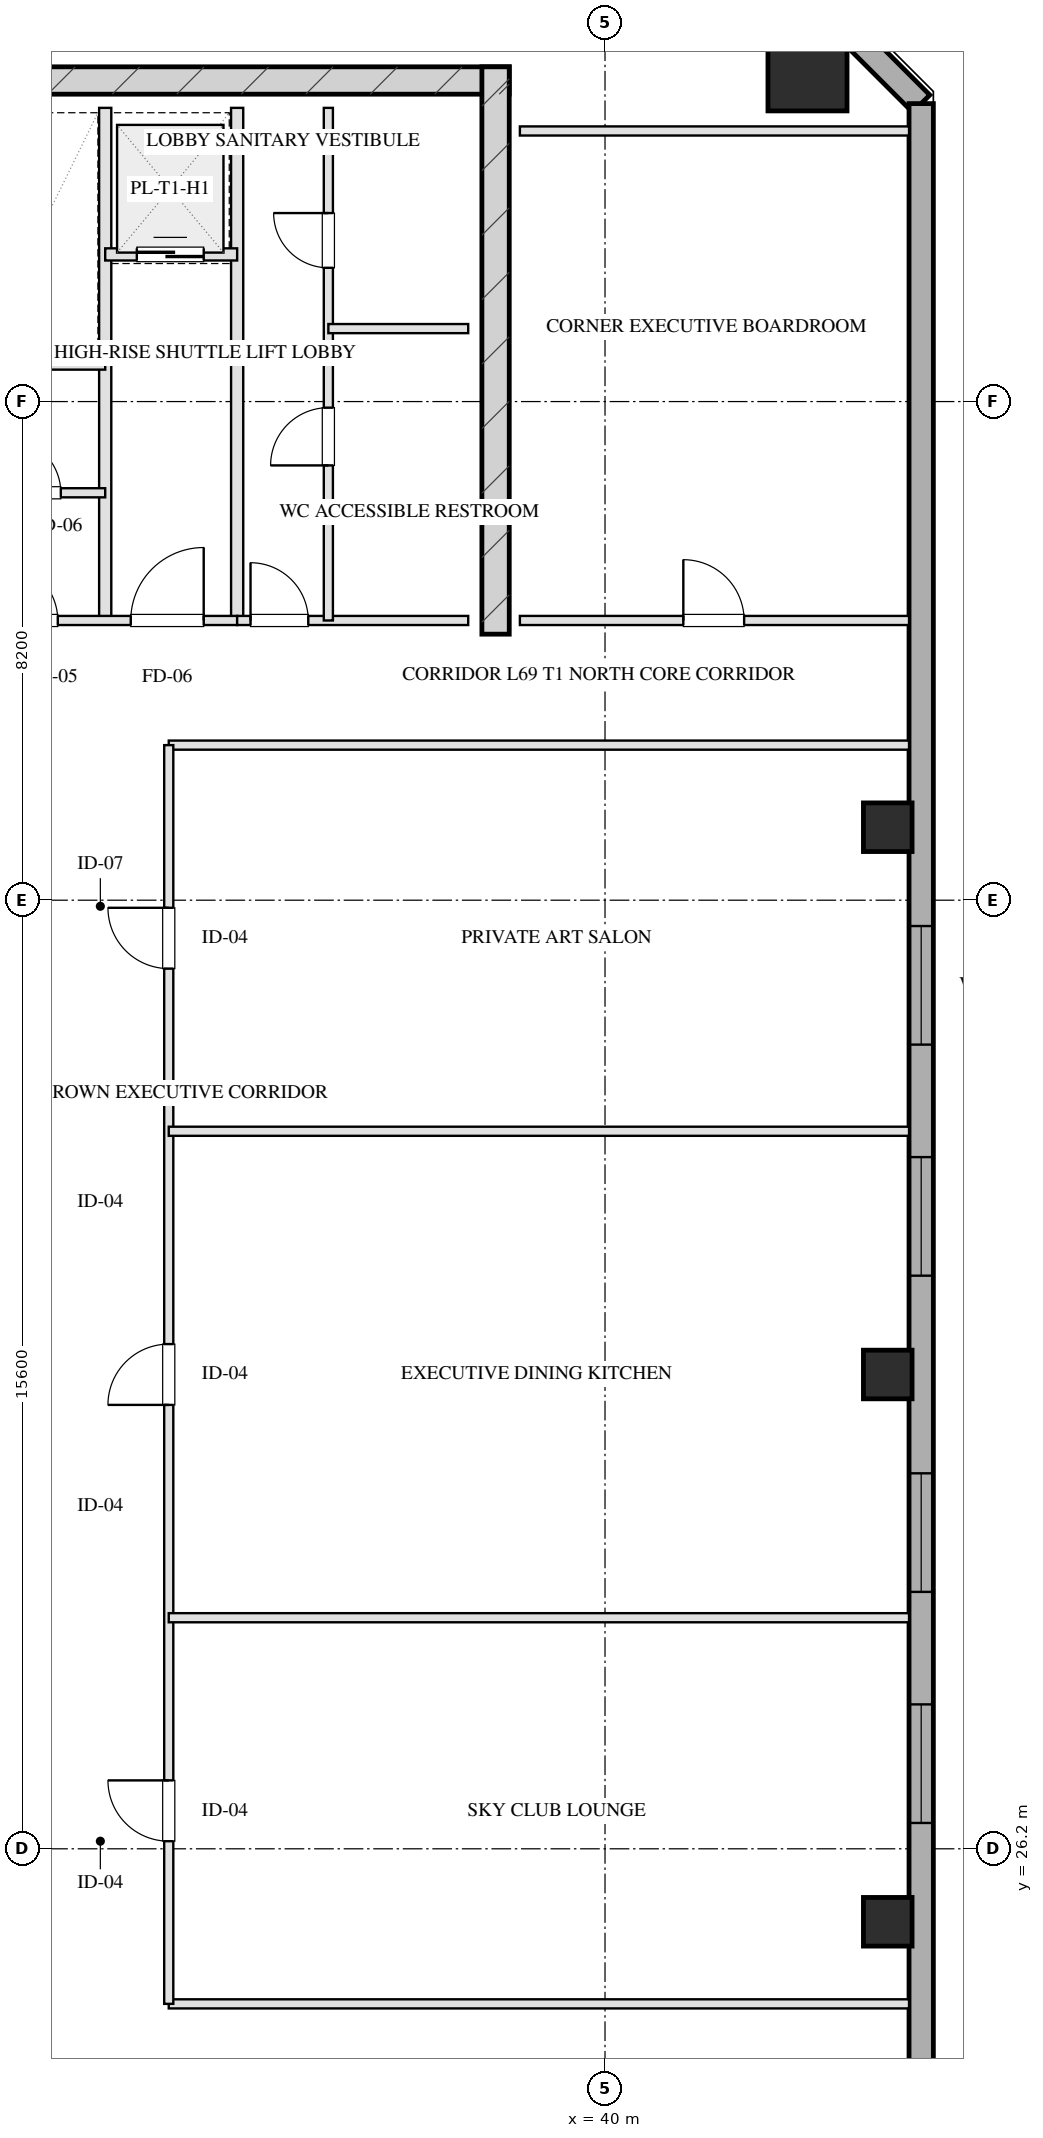
"""IFC4 building model, lengths in metres.
Left out: names, types, materials, properties, quantities, classifications, styles, units other than length and angle.
Written with IfcOpenShell. Run it as: python <this file> out.ifc"""

import sys

from ifc_helpers import new_model, si_unit, direction, frame, frame_2d, origin, origin_2d, place, context, subcontext, project, spatial, rectangle, hollow_rectangle, extrude, element, fill, save


model = new_model("IFC4")
c1 = context("Model", 3, precision=1e-05, world=origin(), true_north=direction((0.0, 1.0)))
c2 = subcontext(c1, "Body", "Model", "MODEL_VIEW")
j1 = project(units=[si_unit("LENGTHUNIT", "METRE"), si_unit("PLANEANGLEUNIT", "RADIAN")], contexts=[c1])
p1 = place(None, origin())
s1 = spatial("IfcSite", under=j1, at=p1, CompositionType="ELEMENT")
p2 = place(p1, origin())
s2 = spatial("IfcBuilding", under=s1, at=p2, CompositionType="ELEMENT")
p3 = place(p2, frame((0.0, 0.0, 253.6)))
s3 = spatial("IfcBuildingStorey", under=s2, at=p3, CompositionType="ELEMENT", Elevation=253.6)
p4 = place(p3, frame((21.575, 55.28, 0.0), z_axis=(0.0, 0.0, 1.0), x_axis=(1.0, 0.0, 0.0)))
e1 = element("IfcWall", 1, at=p4, inside=s3, PredefinedType="SHEAR", context=c2, shape_type="SweptSolid", body=[
    extrude(rectangle(XDim=16.85, YDim=0.45, at=frame_2d((8.425, 0.0))), origin(), (0.0, 0.0, 1.0), 3.2),
])
p5 = place(p3, frame((38.2, 46.175, 0.0), z_axis=(0.0, 0.0, 1.0), x_axis=(0.0, 1.0, 0.0)))
e2 = element("IfcWall", 2, at=p5, inside=s3, PredefinedType="SHEAR", context=c2, shape_type="SweptSolid", body=[
    extrude(rectangle(XDim=9.33, YDim=0.45, at=frame_2d((4.665, 0.0))), origin(), (0.0, 0.0, 1.0), 3.2),
])
p6 = place(p3, frame((43.33, 55.43, 0.0), z_axis=(0.0, 0.0, 1.0), x_axis=(1.0, 0.0, 0.0)))
e3 = element("IfcColumn", 3, at=p6, inside=s3, PredefinedType="COLUMN", context=c2, shape_type="SweptSolid", body=[
    extrude(hollow_rectangle(XDim=1.3, YDim=1.3, WallThickness=0.045, at=origin_2d()), origin(), (0.0, 0.0, 1.0), 3.201),
])
for number, where, z_axis, x_axis in (
    (4, (44.65, 25.0, 0.0), (0.0, 0.0, 1.0), (1.0, 0.0, 0.0)),
    (5, (44.65, 34.0, 0.0), (0.0, 0.0, 1.0), (1.0, 0.0, 0.0)),
    (6, (44.65, 43.0, 0.0), (0.0, 0.0, 1.0), (1.0, 0.0, 0.0)),
):
    element("IfcColumn", number, at=place(p3, frame(where, z_axis=z_axis, x_axis=x_axis)), inside=s3, PredefinedType="COLUMN", context=c2, shape_type="SweptSolid", body=[
        extrude(hollow_rectangle(XDim=0.8, YDim=0.8, WallThickness=0.028, at=origin_2d()), origin(), (0.0, 0.0, 1.0), 3.201),
    ])
p7 = place(p3, frame((42.8, 57.3, 0.0), z_axis=(0.0, 0.0, 1.0), x_axis=(0.707070815327, -0.707142745217, 0.0)))
e7 = element("IfcWall", 7, at=p7, inside=s3, PredefinedType="SOLIDWALL", context=c2, shape_type="SweptSolid", body=[
    extrude(rectangle(XDim=3.394, YDim=0.4, at=frame_2d((1.697, 0.0))), origin(), (0.0, 0.0, 1.0), 2.36),
])
p8 = place(p3, frame((45.2, 54.9, 0.0), z_axis=(0.0, 0.0, 1.0), x_axis=(0.0, -1.0, 0.0)))
e8 = element("IfcWall", 8, at=p8, inside=s3, PredefinedType="SOLIDWALL", context=c2, shape_type="SweptSolid", body=[
    extrude(rectangle(XDim=41.8, YDim=0.4, at=frame_2d((20.9, 0.0))), origin(), (0.0, 0.0, 1.0), 2.36),
])
p9 = place(p8, frame((26.325, 0.0, 0.75)))
e9 = element("IfcOpeningElement", 9, at=p9, cuts=e8, PredefinedType="OPENING", context=c2, shape_type="SweptSolid", body=[
    extrude(rectangle(XDim=1.95, YDim=1.21, at=frame_2d((0.975, 0.605))), frame((0.0, 0.21, 0.0), z_axis=(0.0, -1.0, 0.0), x_axis=(1.0, 0.0, 0.0)), (0.0, 0.0, 1.0), 0.42),
])
p10 = place(p8, frame((22.525, 0.0, 0.75)))
e10 = element("IfcOpeningElement", 10, at=p10, cuts=e8, PredefinedType="OPENING", context=c2, shape_type="SweptSolid", body=[
    extrude(rectangle(XDim=1.95, YDim=1.21, at=frame_2d((0.975, 0.605))), frame((0.0, 0.21, 0.0), z_axis=(0.0, -1.0, 0.0), x_axis=(1.0, 0.0, 0.0)), (0.0, 0.0, 1.0), 0.42),
])
p11 = place(p8, frame((17.325, 0.0, 0.75)))
e11 = element("IfcOpeningElement", 11, at=p11, cuts=e8, PredefinedType="OPENING", context=c2, shape_type="SweptSolid", body=[
    extrude(rectangle(XDim=1.95, YDim=1.21, at=frame_2d((0.975, 0.605))), frame((0.0, 0.21, 0.0), z_axis=(0.0, -1.0, 0.0), x_axis=(1.0, 0.0, 0.0)), (0.0, 0.0, 1.0), 0.42),
])
p12 = place(p8, frame((13.525, 0.0, 0.75)))
e12 = element("IfcOpeningElement", 12, at=p12, cuts=e8, PredefinedType="OPENING", context=c2, shape_type="SweptSolid", body=[
    extrude(rectangle(XDim=1.95, YDim=1.21, at=frame_2d((0.975, 0.605))), frame((0.0, 0.21, 0.0), z_axis=(0.0, -1.0, 0.0), x_axis=(1.0, 0.0, 0.0)), (0.0, 0.0, 1.0), 0.42),
])
for number, where, z_axis, x_axis in (
    (13, (33.95, 46.4, 0.0), (0.0, 0.0, 1.0), (0.0, 1.0, 0.0)),
    (14, (31.78, 46.4, 0.0), (0.0, 0.0, 1.0), (0.0, 1.0, 0.0)),
):
    element("IfcWall", number, at=place(p3, frame(where, z_axis=z_axis, x_axis=x_axis)), inside=s3, PredefinedType="PARTITIONING", context=c2, shape_type="SweptSolid", body=[
        extrude(rectangle(XDim=8.43, YDim=0.2, at=frame_2d((4.215, 0.0))), origin(), (0.0, 0.0, 1.0), 2.925),
    ])
p13 = place(p3, frame((29.55, 46.4, 0.0), z_axis=(0.0, 0.0, 1.0), x_axis=(1.0, 0.0, 0.0)))
e15 = element("IfcWall", 15, at=p13, inside=s3, PredefinedType="PARTITIONING", context=c2, shape_type="SweptSolid", body=[
    extrude(rectangle(XDim=4.4, YDim=0.15, at=frame_2d((2.2, 0.0))), origin(), (0.0, 0.0, 1.0), 2.925),
])
p14 = place(p13, frame((0.5, 0.0, 0.0)))
e16 = element("IfcOpeningElement", 16, at=p14, cuts=e15, PredefinedType="OPENING", context=c2, shape_type="SweptSolid", body=[
    extrude(rectangle(XDim=0.95, YDim=2.05, at=frame_2d((0.475, 1.025))), frame((0.0, 0.085, 0.0), z_axis=(0.0, -1.0, 0.0), x_axis=(1.0, 0.0, 0.0)), (0.0, 0.0, 1.0), 0.17),
])
p15 = place(p13, frame((2.65, 0.0, 0.0)))
e17 = element("IfcOpeningElement", 17, at=p15, cuts=e15, PredefinedType="OPENING", context=c2, shape_type="SweptSolid", body=[
    extrude(rectangle(XDim=1.2, YDim=2.05, at=frame_2d((0.6, 1.025))), frame((0.0, 0.085, 0.0), z_axis=(0.0, -1.0, 0.0), x_axis=(1.0, 0.0, 0.0)), (0.0, 0.0, 1.0), 0.17),
])
p16 = place(p3, frame((29.55, 50.6, 0.0), z_axis=(0.0, 0.0, 1.0), x_axis=(1.0, 0.0, 0.0)))
e18 = element("IfcWall", 18, at=p16, inside=s3, PredefinedType="PARTITIONING", context=c2, shape_type="SweptSolid", body=[
    extrude(rectangle(XDim=2.23, YDim=0.15, at=frame_2d((1.115, 0.0))), origin(), (0.0, 0.0, 1.0), 2.925),
])
p17 = place(p3, frame((29.55, 48.5, 0.0), z_axis=(0.0, 0.0, 1.0), x_axis=(1.0, 0.0, 0.0)))
e19 = element("IfcWall", 19, at=p17, inside=s3, PredefinedType="PARTITIONING", context=c2, shape_type="SweptSolid", body=[
    extrude(rectangle(XDim=2.23, YDim=0.15, at=frame_2d((1.115, 0.0))), origin(), (0.0, 0.0, 1.0), 2.925),
])
p18 = place(p17, frame((0.6, 0.0, 0.0)))
e20 = element("IfcOpeningElement", 20, at=p18, cuts=e19, PredefinedType="OPENING", context=c2, shape_type="SweptSolid", body=[
    extrude(rectangle(XDim=0.9, YDim=2.05, at=frame_2d((0.45, 1.025))), frame((0.0, 0.085, 0.0), z_axis=(0.0, -1.0, 0.0), x_axis=(1.0, 0.0, 0.0)), (0.0, 0.0, 1.0), 0.17),
])
p19 = place(p3, frame((31.78, 52.42, 0.0), z_axis=(0.0, 0.0, 1.0), x_axis=(1.0, 0.0, 0.0)))
e21 = element("IfcWall", 21, at=p19, inside=s3, PredefinedType="PARTITIONING", context=c2, shape_type="SweptSolid", body=[
    extrude(rectangle(XDim=2.17, YDim=0.2, at=frame_2d((1.085, 0.0))), origin(), (0.0, 0.0, 1.0), 2.925),
])
p20 = place(p19, frame((0.52, 0.0, 0.0)))
e22 = element("IfcOpeningElement", 22, at=p20, cuts=e21, PredefinedType="OPENING", context=c2, shape_type="SweptSolid", body=[
    extrude(rectangle(XDim=1.1, YDim=2.05, at=frame_2d((0.55, 1.025))), frame((0.0, 0.11, 0.0), z_axis=(0.0, -1.0, 0.0), x_axis=(1.0, 0.0, 0.0)), (0.0, 0.0, 1.0), 0.22),
])
p21 = place(p3, frame((33.95, 46.4, 0.0), z_axis=(0.0, 0.0, 1.0), x_axis=(1.0, 0.0, 0.0)))
e23 = element("IfcWall", 23, at=p21, inside=s3, PredefinedType="PARTITIONING", context=c2, shape_type="SweptSolid", body=[
    extrude(rectangle(XDim=3.8, YDim=0.15, at=frame_2d((1.9, 0.0))), origin(), (0.0, 0.0, 1.0), 2.925),
])
p22 = place(p21, frame((0.22, 0.0, 0.0)))
e24 = element("IfcOpeningElement", 24, at=p22, cuts=e23, PredefinedType="OPENING", context=c2, shape_type="SweptSolid", body=[
    extrude(rectangle(XDim=0.95, YDim=2.05, at=frame_2d((0.475, 1.025))), frame((0.0, 0.085, 0.0), z_axis=(0.0, -1.0, 0.0), x_axis=(1.0, 0.0, 0.0)), (0.0, 0.0, 1.0), 0.17),
])
p23 = place(p3, frame((35.45, 46.4, 0.0), z_axis=(0.0, 0.0, 1.0), x_axis=(0.0, 1.0, 0.0)))
e25 = element("IfcWall", 25, at=p23, inside=s3, PredefinedType="PARTITIONING", context=c2, shape_type="SweptSolid", body=[
    extrude(rectangle(XDim=8.43, YDim=0.15, at=frame_2d((4.215, 0.0))), origin(), (0.0, 0.0, 1.0), 2.565),
])
p24 = place(p23, frame((2.55, 0.0, 0.0)))
e26 = element("IfcOpeningElement", 26, at=p24, cuts=e25, PredefinedType="OPENING", context=c2, shape_type="SweptSolid", body=[
    extrude(rectangle(XDim=0.95, YDim=2.05, at=frame_2d((0.475, 1.025))), frame((0.0, 0.085, 0.0), z_axis=(0.0, -1.0, 0.0), x_axis=(1.0, 0.0, 0.0)), (0.0, 0.0, 1.0), 0.17),
])
p25 = place(p23, frame((5.8, 0.0, 0.0)))
e27 = element("IfcOpeningElement", 27, at=p25, cuts=e25, PredefinedType="OPENING", context=c2, shape_type="SweptSolid", body=[
    extrude(rectangle(XDim=0.9, YDim=2.05, at=frame_2d((0.45, 1.025))), frame((0.0, 0.085, 0.0), z_axis=(0.0, -1.0, 0.0), x_axis=(1.0, 0.0, 0.0)), (0.0, 0.0, 1.0), 0.17),
])
p26 = place(p3, frame((35.45, 51.2, 0.0), z_axis=(0.0, 0.0, 1.0), x_axis=(1.0, 0.0, 0.0)))
e28 = element("IfcWall", 28, at=p26, inside=s3, PredefinedType="PARTITIONING", context=c2, shape_type="SweptSolid", body=[
    extrude(rectangle(XDim=2.3, YDim=0.15, at=frame_2d((1.15, 0.0))), origin(), (0.0, 0.0, 1.0), 2.925),
])
p27 = place(p3, frame((38.6, 54.45, 0.0), z_axis=(0.0, 0.0, 1.0), x_axis=(1.0, 0.0, 0.0)))
e29 = element("IfcWall", 29, at=p27, inside=s3, PredefinedType="PARTITIONING", context=c2, shape_type="SweptSolid", body=[
    extrude(rectangle(XDim=6.4, YDim=0.15, at=frame_2d((3.2, 0.0))), origin(), (0.0, 0.0, 1.0), 2.925),
])
p28 = place(p3, frame((38.6, 46.4, 0.0), z_axis=(0.0, 0.0, 1.0), x_axis=(1.0, 0.0, 0.0)))
e30 = element("IfcWall", 30, at=p28, inside=s3, PredefinedType="PARTITIONING", context=c2, shape_type="SweptSolid", body=[
    extrude(rectangle(XDim=6.4, YDim=0.15, at=frame_2d((3.2, 0.0))), origin(), (0.0, 0.0, 1.0), 2.925),
])
p29 = place(p28, frame((2.688, 0.0, 0.0)))
e31 = element("IfcOpeningElement", 31, at=p29, cuts=e30, PredefinedType="OPENING", context=c2, shape_type="SweptSolid", body=[
    extrude(rectangle(XDim=1.0, YDim=2.05, at=frame_2d((0.5, 1.025))), frame((0.0, 0.085, 0.0), z_axis=(0.0, -1.0, 0.0), x_axis=(1.0, 0.0, 0.0)), (0.0, 0.0, 1.0), 0.17),
])
for number, where, z_axis, x_axis in (
    (32, (32.825, 23.65, 0.0), (0.0, 0.0, 1.0), (1.0, 0.0, 0.0)),
    (33, (32.825, 44.35, 0.0), (0.0, 0.0, 1.0), (1.0, 0.0, 0.0)),
):
    element("IfcWall", number, at=place(p3, frame(where, z_axis=z_axis, x_axis=x_axis)), inside=s3, PredefinedType="PARTITIONING", context=c2, shape_type="SweptSolid", body=[
        extrude(rectangle(XDim=12.175, YDim=0.15, at=frame_2d((6.087, 0.0))), origin(), (0.0, 0.0, 1.0), 2.925),
    ])
p30 = place(p3, frame((32.825, 23.65, 0.0), z_axis=(0.0, 0.0, 1.0), x_axis=(0.0, 1.0, 0.0)))
e34 = element("IfcWall", 34, at=p30, inside=s3, PredefinedType="PARTITIONING", context=c2, shape_type="SweptSolid", body=[
    extrude(rectangle(XDim=20.7, YDim=0.15, at=frame_2d((10.35, 0.0))), origin(), (0.0, 0.0, 1.0), 2.925),
])
p31 = place(p30, frame((2.675, 0.0, 0.0)))
e35 = element("IfcOpeningElement", 35, at=p31, cuts=e34, PredefinedType="OPENING", context=c2, shape_type="SweptSolid", body=[
    extrude(rectangle(XDim=1.0, YDim=2.05, at=frame_2d((0.5, 1.025))), frame((0.0, 0.085, 0.0), z_axis=(0.0, -1.0, 0.0), x_axis=(1.0, 0.0, 0.0)), (0.0, 0.0, 1.0), 0.17),
])
p32 = place(p30, frame((9.85, 0.0, 0.0)))
e36 = element("IfcOpeningElement", 36, at=p32, cuts=e34, PredefinedType="OPENING", context=c2, shape_type="SweptSolid", body=[
    extrude(rectangle(XDim=1.0, YDim=2.05, at=frame_2d((0.5, 1.025))), frame((0.0, 0.085, 0.0), z_axis=(0.0, -1.0, 0.0), x_axis=(1.0, 0.0, 0.0)), (0.0, 0.0, 1.0), 0.17),
])
p33 = place(p30, frame((17.025, 0.0, 0.0)))
e37 = element("IfcOpeningElement", 37, at=p33, cuts=e34, PredefinedType="OPENING", context=c2, shape_type="SweptSolid", body=[
    extrude(rectangle(XDim=1.0, YDim=2.05, at=frame_2d((0.5, 1.025))), frame((0.0, 0.085, 0.0), z_axis=(0.0, -1.0, 0.0), x_axis=(1.0, 0.0, 0.0)), (0.0, 0.0, 1.0), 0.17),
])
for number, where, z_axis, x_axis in (
    (38, (32.825, 30.0, 0.0), (0.0, 0.0, 1.0), (1.0, 0.0, 0.0)),
    (39, (32.825, 38.0, 0.0), (0.0, 0.0, 1.0), (1.0, 0.0, 0.0)),
):
    element("IfcWall", number, at=place(p3, frame(where, z_axis=z_axis, x_axis=x_axis)), inside=s3, PredefinedType="PARTITIONING", context=c2, shape_type="SweptSolid", body=[
        extrude(rectangle(XDim=12.175, YDim=0.15, at=frame_2d((6.087, 0.0))), origin(), (0.0, 0.0, 1.0), 2.925),
    ])
p34 = place(p9, origin())
e40 = element("IfcWindow", 40, at=p34, inside=s3, PartitioningType="TRIPLE_PANEL_VERTICAL", PredefinedType="WINDOW", context=c2, shape_type="SweptSolid", body=[
    extrude(rectangle(XDim=1.95, YDim=1.21, at=frame_2d((0.975, 0.605))), frame((0.0, 0.03, 0.0), z_axis=(0.0, -1.0, 0.0), x_axis=(1.0, 0.0, 0.0)), (0.0, 0.0, 1.0), 0.06),
])
fill(e9, e40)
p35 = place(p10, origin())
e41 = element("IfcWindow", 41, at=p35, inside=s3, PartitioningType="TRIPLE_PANEL_VERTICAL", PredefinedType="WINDOW", context=c2, shape_type="SweptSolid", body=[
    extrude(rectangle(XDim=1.95, YDim=1.21, at=frame_2d((0.975, 0.605))), frame((0.0, 0.03, 0.0), z_axis=(0.0, -1.0, 0.0), x_axis=(1.0, 0.0, 0.0)), (0.0, 0.0, 1.0), 0.06),
])
fill(e10, e41)
p36 = place(p11, origin())
e42 = element("IfcWindow", 42, at=p36, inside=s3, PartitioningType="TRIPLE_PANEL_VERTICAL", PredefinedType="WINDOW", context=c2, shape_type="SweptSolid", body=[
    extrude(rectangle(XDim=1.95, YDim=1.21, at=frame_2d((0.975, 0.605))), frame((0.0, 0.03, 0.0), z_axis=(0.0, -1.0, 0.0), x_axis=(1.0, 0.0, 0.0)), (0.0, 0.0, 1.0), 0.06),
])
fill(e11, e42)
p37 = place(p12, origin())
e43 = element("IfcWindow", 43, at=p37, inside=s3, PartitioningType="TRIPLE_PANEL_VERTICAL", PredefinedType="WINDOW", context=c2, shape_type="SweptSolid", body=[
    extrude(rectangle(XDim=1.95, YDim=1.21, at=frame_2d((0.975, 0.605))), frame((0.0, 0.03, 0.0), z_axis=(0.0, -1.0, 0.0), x_axis=(1.0, 0.0, 0.0)), (0.0, 0.0, 1.0), 0.06),
])
fill(e12, e43)
p38 = place(p14, origin())
e44 = element("IfcDoor", 44, at=p38, inside=s3, OperationType="SINGLE_SWING_LEFT", PredefinedType="DOOR", context=c2, shape_type="SweptSolid", body=[
    extrude(rectangle(XDim=0.95, YDim=2.05, at=frame_2d((0.475, 1.025))), frame((0.0, 0.025, 0.0), z_axis=(0.0, -1.0, 0.0), x_axis=(1.0, 0.0, 0.0)), (0.0, 0.0, 1.0), 0.05),
])
fill(e16, e44)
p39 = place(p15, origin())
e45 = element("IfcDoor", 45, at=p39, inside=s3, OperationType="SINGLE_SWING_RIGHT", PredefinedType="DOOR", context=c2, shape_type="SweptSolid", body=[
    extrude(rectangle(XDim=1.2, YDim=2.05, at=frame_2d((0.6, 1.025))), frame((0.0, 0.025, 0.0), z_axis=(0.0, -1.0, 0.0), x_axis=(1.0, 0.0, 0.0)), (0.0, 0.0, 1.0), 0.05),
])
fill(e17, e45)
p40 = place(p18, origin())
e46 = element("IfcDoor", 46, at=p40, inside=s3, OperationType="SINGLE_SWING_LEFT", PredefinedType="DOOR", context=c2, shape_type="SweptSolid", body=[
    extrude(rectangle(XDim=0.9, YDim=2.05, at=frame_2d((0.45, 1.025))), frame((0.0, 0.025, 0.0), z_axis=(0.0, -1.0, 0.0), x_axis=(1.0, 0.0, 0.0)), (0.0, 0.0, 1.0), 0.05),
])
fill(e20, e46)
p41 = place(p20, origin())
e47 = element("IfcDoor", 47, at=p41, inside=s3, OperationType="DOUBLE_DOOR_SLIDING", PredefinedType="DOOR", context=c2, shape_type="SweptSolid", body=[
    extrude(rectangle(XDim=1.1, YDim=2.05, at=frame_2d((0.55, 1.025))), frame((0.0, 0.025, 0.0), z_axis=(0.0, -1.0, 0.0), x_axis=(1.0, 0.0, 0.0)), (0.0, 0.0, 1.0), 0.05),
])
fill(e22, e47)
p42 = place(p22, origin())
e48 = element("IfcDoor", 48, at=p42, inside=s3, OperationType="SINGLE_SWING_LEFT", PredefinedType="DOOR", context=c2, shape_type="SweptSolid", body=[
    extrude(rectangle(XDim=0.95, YDim=2.05, at=frame_2d((0.475, 1.025))), frame((0.0, 0.025, 0.0), z_axis=(0.0, -1.0, 0.0), x_axis=(1.0, 0.0, 0.0)), (0.0, 0.0, 1.0), 0.05),
])
fill(e24, e48)
p43 = place(p24, origin())
e49 = element("IfcDoor", 49, at=p43, inside=s3, OperationType="SINGLE_SWING_LEFT", PredefinedType="DOOR", context=c2, shape_type="SweptSolid", body=[
    extrude(rectangle(XDim=0.95, YDim=2.05, at=frame_2d((0.475, 1.025))), frame((0.0, 0.025, 0.0), z_axis=(0.0, -1.0, 0.0), x_axis=(1.0, 0.0, 0.0)), (0.0, 0.0, 1.0), 0.05),
])
fill(e26, e49)
p44 = place(p25, origin())
e50 = element("IfcDoor", 50, at=p44, inside=s3, OperationType="SINGLE_SWING_RIGHT", PredefinedType="DOOR", context=c2, shape_type="SweptSolid", body=[
    extrude(rectangle(XDim=0.9, YDim=2.05, at=frame_2d((0.45, 1.025))), frame((0.0, 0.025, 0.0), z_axis=(0.0, -1.0, 0.0), x_axis=(1.0, 0.0, 0.0)), (0.0, 0.0, 1.0), 0.05),
])
fill(e27, e50)
p45 = place(p29, origin())
e51 = element("IfcDoor", 51, at=p45, inside=s3, OperationType="SINGLE_SWING_LEFT", PredefinedType="DOOR", context=c2, shape_type="SweptSolid", body=[
    extrude(rectangle(XDim=1.0, YDim=2.05, at=frame_2d((0.5, 1.025))), frame((0.0, 0.025, 0.0), z_axis=(0.0, -1.0, 0.0), x_axis=(1.0, 0.0, 0.0)), (0.0, 0.0, 1.0), 0.05),
])
fill(e31, e51)
p46 = place(p31, origin())
e52 = element("IfcDoor", 52, at=p46, inside=s3, OperationType="SINGLE_SWING_RIGHT", PredefinedType="DOOR", context=c2, shape_type="SweptSolid", body=[
    extrude(rectangle(XDim=1.0, YDim=2.05, at=frame_2d((0.5, 1.025))), frame((0.0, 0.025, 0.0), z_axis=(0.0, -1.0, 0.0), x_axis=(1.0, 0.0, 0.0)), (0.0, 0.0, 1.0), 0.05),
])
fill(e35, e52)
p47 = place(p32, origin())
e53 = element("IfcDoor", 53, at=p47, inside=s3, OperationType="SINGLE_SWING_LEFT", PredefinedType="DOOR", context=c2, shape_type="SweptSolid", body=[
    extrude(rectangle(XDim=1.0, YDim=2.05, at=frame_2d((0.5, 1.025))), frame((0.0, 0.025, 0.0), z_axis=(0.0, -1.0, 0.0), x_axis=(1.0, 0.0, 0.0)), (0.0, 0.0, 1.0), 0.05),
])
fill(e36, e53)
p48 = place(p33, origin())
e54 = element("IfcDoor", 54, at=p48, inside=s3, OperationType="SINGLE_SWING_RIGHT", PredefinedType="DOOR", context=c2, shape_type="SweptSolid", body=[
    extrude(rectangle(XDim=1.0, YDim=2.05, at=frame_2d((0.5, 1.025))), frame((0.0, 0.025, 0.0), z_axis=(0.0, -1.0, 0.0), x_axis=(1.0, 0.0, 0.0)), (0.0, 0.0, 1.0), 0.05),
])
fill(e37, e54)
save(model, sys.argv[1])
